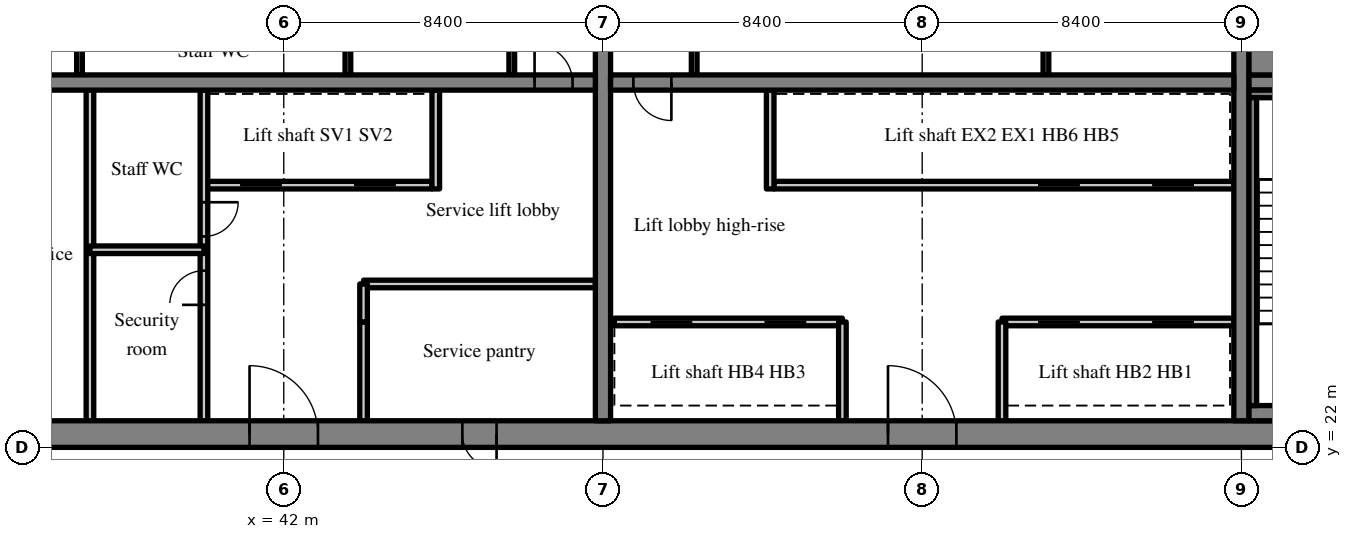
"""IFC4 building model, lengths in metres.
Left out: names, types, materials, properties, quantities, classifications, styles, units other than length and angle.
Written with IfcOpenShell. Run it as: python <this file> out.ifc"""

import sys

from ifc_helpers import new_model, si_unit, direction, frame, frame_2d, origin, place, context, subcontext, project, spatial, rectangle, extrude, source, transform, mapped, element, fill, save


model = new_model("IFC4")
c1 = context("Model", 3, precision=1e-05, world=origin(), true_north=direction((0.0, 1.0)))
c2 = subcontext(c1, "Body", "Model", "MODEL_VIEW")
j1 = project(units=[si_unit("LENGTHUNIT", "METRE"), si_unit("PLANEANGLEUNIT", "RADIAN")], contexts=[c1])
p1 = place(None, origin())
s1 = spatial("IfcSite", under=j1, at=p1, CompositionType="ELEMENT")
p2 = place(p1, origin())
s2 = spatial("IfcBuilding", under=s1, at=p2, CompositionType="ELEMENT")
p3 = place(p2, frame((0.0, 0.0, 193.4)))
s3 = spatial("IfcBuildingStorey", under=s2, at=p3, CompositionType="ELEMENT", Elevation=193.4)
m1 = source(origin(), c2, "Body", "SweptSolid", [
    extrude(rectangle(XDim=50.4, YDim=0.7, at=frame_2d((25.2, 0.0))), origin(), (0.0, 0.0, 1.0), 3.52),
])
p4 = place(p3, frame((25.2, 22.35, 0.0), z_axis=(0.0, 0.0, 1.0), x_axis=(1.0, 0.0, 0.0)))
e1 = element("IfcWall", 1, at=p4, inside=s3, PredefinedType="SHEAR", context=c2, shape_type="MappedRepresentation", body=[
    mapped(m1, transform((0.0, 0.0, 0.0), scale=1.0)),
])
m2 = source(origin(), c2, "Body", "SweptSolid", [
    extrude(rectangle(XDim=1.8, YDim=2.1, at=frame_2d((0.9, 1.05))), frame((0.0, 0.36, 0.0), z_axis=(0.0, -1.0, 0.0), x_axis=(1.0, 0.0, 0.0)), (0.0, 0.0, 1.0), 0.72),
])
p5 = place(p4, frame((15.9, 0.0, 0.0)))
e2 = element("IfcOpeningElement", 2, at=p5, cuts=e1, PredefinedType="OPENING", context=c2, shape_type="MappedRepresentation", body=[
    mapped(m2, transform((0.0, 0.0, 0.0), scale=1.0)),
])
m3 = source(origin(), c2, "Body", "SweptSolid", [
    extrude(rectangle(XDim=0.9, YDim=2.1, at=frame_2d((0.45, 1.05))), frame((0.0, 0.36, 0.0), z_axis=(0.0, -1.0, 0.0), x_axis=(1.0, 0.0, 0.0)), (0.0, 0.0, 1.0), 0.72),
])
p6 = place(p4, frame((9.7, 0.0, 0.0)))
e3 = element("IfcOpeningElement", 3, at=p6, cuts=e1, PredefinedType="OPENING", context=c2, shape_type="MappedRepresentation", body=[
    mapped(m3, transform((0.0, 0.0, 0.0), scale=1.0)),
])
p7 = place(p4, frame((21.5, 0.0, 0.0)))
e4 = element("IfcOpeningElement", 4, at=p7, cuts=e1, PredefinedType="OPENING", context=c2, shape_type="MappedRepresentation", body=[
    mapped(m3, transform((0.0, 0.0, 0.0), scale=1.0)),
])
p8 = place(p4, frame((32.7, 0.0, 0.0)))
e5 = element("IfcOpeningElement", 5, at=p8, cuts=e1, PredefinedType="OPENING", context=c2, shape_type="MappedRepresentation", body=[
    mapped(m2, transform((0.0, 0.0, 0.0), scale=1.0)),
])
m4 = source(origin(), c2, "Body", "SweptSolid", [
    extrude(rectangle(XDim=1.2, YDim=2.1, at=frame_2d((0.6, 1.05))), frame((0.0, 0.36, 0.0), z_axis=(0.0, -1.0, 0.0), x_axis=(1.0, 0.0, 0.0)), (0.0, 0.0, 1.0), 0.72),
])
p9 = place(p4, frame((6.475, 0.0, 0.0)))
e6 = element("IfcOpeningElement", 6, at=p9, cuts=e1, PredefinedType="OPENING", context=c2, shape_type="MappedRepresentation", body=[
    mapped(m4, transform((0.0, 0.0, 0.0), scale=1.0)),
])
p10 = place(p4, frame((47.875, 0.0, 0.0)))
e7 = element("IfcOpeningElement", 7, at=p10, cuts=e1, PredefinedType="OPENING", context=c2, shape_type="MappedRepresentation", body=[
    mapped(m4, transform((0.0, 0.0, 0.0), scale=1.0)),
])
m5 = source(origin(), c2, "Body", "SweptSolid", [
    extrude(rectangle(XDim=18.6, YDim=0.4, at=frame_2d((9.3, 0.0))), origin(), (0.0, 0.0, 1.0), 3.52),
])
p11 = place(p3, frame((50.4, 22.7, 0.0), z_axis=(0.0, 0.0, 1.0), x_axis=(0.0, 1.0, 0.0)))
e8 = element("IfcWall", 8, at=p11, inside=s3, PredefinedType="SHEAR", context=c2, shape_type="MappedRepresentation", body=[
    mapped(m5, transform((0.0, 0.0, 0.0), scale=1.0)),
])
m6 = source(origin(), c2, "Body", "SweptSolid", [
    extrude(rectangle(XDim=1.1, YDim=2.1, at=frame_2d((0.55, 1.05))), frame((0.0, 0.21, 0.0), z_axis=(0.0, -1.0, 0.0), x_axis=(1.0, 0.0, 0.0)), (0.0, 0.0, 1.0), 0.42),
])
p12 = place(p11, frame((12.75, 0.0, 0.0)))
e9 = element("IfcOpeningElement", 9, at=p12, cuts=e8, PredefinedType="OPENING", context=c2, shape_type="MappedRepresentation", body=[
    mapped(m6, transform((0.0, 0.0, 0.0), scale=1.0)),
])
p13 = place(p3, frame((67.2, 22.7, 0.0), z_axis=(0.0, 0.0, 1.0), x_axis=(0.0, 1.0, 0.0)))
e10 = element("IfcWall", 10, at=p13, inside=s3, PredefinedType="SHEAR", context=c2, shape_type="MappedRepresentation", body=[
    mapped(m5, transform((0.0, 0.0, 0.0), scale=1.0)),
])
m7 = source(origin(), c2, "Body", "SweptSolid", [
    extrude(rectangle(XDim=16.4, YDim=0.4, at=frame_2d((8.2, 0.0))), origin(), (0.0, 0.0, 1.0), 3.52),
])
p14 = place(p3, frame((33.8, 31.6, 0.0), z_axis=(0.0, 0.0, 1.0), x_axis=(1.0, 0.0, 0.0)))
e11 = element("IfcWall", 11, at=p14, inside=s3, PredefinedType="SHEAR", context=c2, shape_type="MappedRepresentation", body=[
    mapped(m7, transform((0.0, 0.0, 0.0), scale=1.0)),
])
m8 = source(origin(), c2, "Body", "SweptSolid", [
    extrude(rectangle(XDim=1.0, YDim=2.1, at=frame_2d((0.5, 1.05))), frame((0.0, 0.21, 0.0), z_axis=(0.0, -1.0, 0.0), x_axis=(1.0, 0.0, 0.0)), (0.0, 0.0, 1.0), 0.42),
])
p15 = place(p14, frame((14.8, 0.0, 0.0)))
e12 = element("IfcOpeningElement", 12, at=p15, cuts=e11, PredefinedType="OPENING", context=c2, shape_type="MappedRepresentation", body=[
    mapped(m8, transform((0.0, 0.0, 0.0), scale=1.0)),
])
p16 = place(p3, frame((50.6, 31.6, 0.0), z_axis=(0.0, 0.0, 1.0), x_axis=(1.0, 0.0, 0.0)))
e13 = element("IfcWall", 13, at=p16, inside=s3, PredefinedType="SHEAR", context=c2, shape_type="MappedRepresentation", body=[
    mapped(m7, transform((0.0, 0.0, 0.0), scale=1.0)),
])
p17 = place(p16, frame((0.6, 0.0, 0.0)))
e14 = element("IfcOpeningElement", 14, at=p17, cuts=e13, PredefinedType="OPENING", context=c2, shape_type="MappedRepresentation", body=[
    mapped(m8, transform((0.0, 0.0, 0.0), scale=1.0)),
])
m9 = source(origin(), c2, "Body", "SweptSolid", [
    extrude(rectangle(XDim=7.5, YDim=0.4, at=frame_2d((3.75, 0.0))), origin(), (0.0, 0.0, 1.0), 3.52),
])
p18 = place(p3, frame((67.4, 31.6, 0.0), z_axis=(0.0, 0.0, 1.0), x_axis=(1.0, 0.0, 0.0)))
e15 = element("IfcWall", 15, at=p18, inside=s3, PredefinedType="SHEAR", context=c2, shape_type="MappedRepresentation", body=[
    mapped(m9, transform((0.0, 0.0, 0.0), scale=1.0)),
])
p19 = place(p18, frame((5.725, 0.0, 0.0)))
e16 = element("IfcOpeningElement", 16, at=p19, cuts=e15, PredefinedType="OPENING", context=c2, shape_type="MappedRepresentation", body=[
    mapped(m6, transform((0.0, 0.0, 0.0), scale=1.0)),
])
m10 = source(origin(), c2, "Body", "SweptSolid", [
    extrude(rectangle(XDim=6.0, YDim=0.2, at=frame_2d((3.0, 0.0))), origin(), (0.0, 0.0, 1.0), 3.52),
])
p20 = place(p3, frame((39.9, 28.9, 0.0), z_axis=(0.0, 0.0, 1.0), x_axis=(1.0, 0.0, 0.0)))
e17 = element("IfcWall", 17, at=p20, inside=s3, PredefinedType="SOLIDWALL", context=c2, shape_type="MappedRepresentation", body=[
    mapped(m10, transform((0.0, 0.0, 0.0), scale=1.0)),
])
m11 = source(origin(), c2, "Body", "SweptSolid", [
    extrude(rectangle(XDim=1.1, YDim=2.1, at=frame_2d((0.55, 1.05))), frame((0.0, 0.11, 0.0), z_axis=(0.0, -1.0, 0.0), x_axis=(1.0, 0.0, 0.0)), (0.0, 0.0, 1.0), 0.22),
])
p21 = place(p20, frame((0.95, 0.0, 0.0)))
e18 = element("IfcOpeningElement", 18, at=p21, cuts=e17, PredefinedType="OPENING", context=c2, shape_type="MappedRepresentation", body=[
    mapped(m11, transform((0.0, 0.0, 0.0), scale=1.0)),
])
p22 = place(p20, frame((3.95, 0.0, 0.0)))
e19 = element("IfcOpeningElement", 19, at=p22, cuts=e17, PredefinedType="OPENING", context=c2, shape_type="MappedRepresentation", body=[
    mapped(m11, transform((0.0, 0.0, 0.0), scale=1.0)),
])
m12 = source(origin(), c2, "Body", "SweptSolid", [
    extrude(rectangle(XDim=8.7, YDim=0.2, at=frame_2d((4.35, 0.0))), origin(), (0.0, 0.0, 1.0), 3.52),
])
p23 = place(p3, frame((39.9, 22.7, 0.0), z_axis=(0.0, 0.0, 1.0), x_axis=(0.0, 1.0, 0.0)))
e20 = element("IfcWall", 20, at=p23, inside=s3, PredefinedType="PARTITIONING", context=c2, shape_type="MappedRepresentation", body=[
    mapped(m12, transform((0.0, 0.0, 0.0), scale=1.0)),
])
m13 = source(origin(), c2, "Body", "SweptSolid", [
    extrude(rectangle(XDim=0.9, YDim=2.1, at=frame_2d((0.45, 1.05))), frame((0.0, 0.11, 0.0), z_axis=(0.0, -1.0, 0.0), x_axis=(1.0, 0.0, 0.0)), (0.0, 0.0, 1.0), 0.22),
])
p24 = place(p23, frame((3.05, 0.0, 0.0)))
e21 = element("IfcOpeningElement", 21, at=p24, cuts=e20, PredefinedType="OPENING", context=c2, shape_type="MappedRepresentation", body=[
    mapped(m13, transform((0.0, 0.0, 0.0), scale=1.0)),
])
p25 = place(p23, frame((4.85, 0.0, 0.0)))
e22 = element("IfcOpeningElement", 22, at=p25, cuts=e20, PredefinedType="OPENING", context=c2, shape_type="MappedRepresentation", body=[
    mapped(m13, transform((0.0, 0.0, 0.0), scale=1.0)),
])
m14 = source(origin(), c2, "Body", "SweptSolid", [
    extrude(rectangle(XDim=2.6, YDim=0.2, at=frame_2d((1.3, 0.0))), origin(), (0.0, 0.0, 1.0), 3.52),
])
p26 = place(p3, frame((44.1, 22.7, 0.0), z_axis=(0.0, 0.0, 1.0), x_axis=(0.0, 1.0, 0.0)))
e23 = element("IfcWall", 23, at=p26, inside=s3, PredefinedType="PARTITIONING", context=c2, shape_type="MappedRepresentation", body=[
    mapped(m14, transform((0.0, 0.0, 0.0), scale=1.0)),
])
m15 = source(origin(), c2, "Body", "SweptSolid", [
    extrude(rectangle(XDim=2.6, YDim=0.2, at=frame_2d((1.3, 0.0))), origin(), (0.0, 0.0, 1.0), 3.52),
])
p27 = place(p3, frame((46.0, 28.8, 0.0), z_axis=(0.0, 0.0, 1.0), x_axis=(0.0, 1.0, 0.0)))
e24 = element("IfcWall", 24, at=p27, inside=s3, PredefinedType="SOLIDWALL", context=c2, shape_type="MappedRepresentation", body=[
    mapped(m15, transform((0.0, 0.0, 0.0), scale=1.0)),
])
p28 = place(p3, frame((36.9, 22.7, 0.0), z_axis=(0.0, 0.0, 1.0), x_axis=(0.0, 1.0, 0.0)))
e25 = element("IfcWall", 25, at=p28, inside=s3, PredefinedType="PARTITIONING", context=c2, shape_type="MappedRepresentation", body=[
    mapped(m12, transform((0.0, 0.0, 0.0), scale=1.0)),
])
m16 = source(origin(), c2, "Body", "SweptSolid", [
    extrude(rectangle(XDim=3.0, YDim=0.2, at=frame_2d((1.5, 0.0))), origin(), (0.0, 0.0, 1.0), 3.52),
])
p29 = place(p3, frame((36.9, 27.2, 0.0), z_axis=(0.0, 0.0, 1.0), x_axis=(1.0, 0.0, 0.0)))
e26 = element("IfcWall", 26, at=p29, inside=s3, PredefinedType="PARTITIONING", context=c2, shape_type="MappedRepresentation", body=[
    mapped(m16, transform((0.0, 0.0, 0.0), scale=1.0)),
])
m17 = source(origin(), c2, "Body", "SweptSolid", [
    extrude(rectangle(XDim=6.1, YDim=0.2, at=frame_2d((3.05, 0.0))), origin(), (0.0, 0.0, 1.0), 3.52),
])
p30 = place(p3, frame((44.1, 26.3, 0.0), z_axis=(0.0, 0.0, 1.0), x_axis=(1.0, 0.0, 0.0)))
e27 = element("IfcWall", 27, at=p30, inside=s3, PredefinedType="PARTITIONING", context=c2, shape_type="MappedRepresentation", body=[
    mapped(m17, transform((0.0, 0.0, 0.0), scale=1.0)),
])
m18 = source(origin(), c2, "Body", "SweptSolid", [
    extrude(rectangle(XDim=1.0, YDim=0.2, at=frame_2d((0.5, 0.0))), origin(), (0.0, 0.0, 1.0), 3.52),
])
p31 = place(p3, frame((44.1, 25.3, 0.0), z_axis=(0.0, 0.0, 1.0), x_axis=(0.0, 1.0, 0.0)))
e28 = element("IfcWall", 28, at=p31, inside=s3, PredefinedType="PARTITIONING", context=c2, shape_type="MappedRepresentation", body=[
    mapped(m18, transform((0.0, 0.0, 0.0), scale=1.0)),
])
m19 = source(origin(), c2, "Body", "SweptSolid", [
    extrude(rectangle(XDim=3.2, YDim=0.15, at=frame_2d((1.6, 0.0))), origin(), (0.0, 0.0, 1.0), 3.52),
])
for number, where, z_axis, x_axis in (
    (29, (48.0, 31.8, 0.0), (0.0, 0.0, 1.0), (0.0, 1.0, 0.0)),
    (30, (36.625, 31.8, 0.0), (0.0, 0.0, 1.0), (0.0, 1.0, 0.0)),
    (31, (43.688, 31.8, 0.0), (0.0, 0.0, 1.0), (0.0, 1.0, 0.0)),
):
    element("IfcWall", number, at=place(p3, frame(where, z_axis=z_axis, x_axis=x_axis)), inside=s3, PredefinedType="PARTITIONING", context=c2, shape_type="MappedRepresentation", body=[
        mapped(m19, transform((0.0, 0.0, 0.0), scale=1.0)),
    ])
m20 = source(origin(), c2, "Body", "SweptSolid", [
    extrude(rectangle(XDim=6.1, YDim=0.2, at=frame_2d((3.05, 0.0))), origin(), (0.0, 0.0, 1.0), 3.52),
])
p32 = place(p3, frame((67.0, 25.3, 0.0), z_axis=(0.0, 0.0, 1.0), x_axis=(-1.0, 0.0, 0.0)))
e32 = element("IfcWall", 32, at=p32, inside=s3, PredefinedType="SOLIDWALL", context=c2, shape_type="MappedRepresentation", body=[
    mapped(m20, transform((0.0, 0.0, 0.0), scale=1.0)),
])
p33 = place(p32, frame((1.05, 0.0, 0.0)))
e33 = element("IfcOpeningElement", 33, at=p33, cuts=e32, PredefinedType="OPENING", context=c2, shape_type="MappedRepresentation", body=[
    mapped(m11, transform((0.0, 0.0, 0.0), scale=1.0)),
])
p34 = place(p32, frame((4.05, 0.0, 0.0)))
e34 = element("IfcOpeningElement", 34, at=p34, cuts=e32, PredefinedType="OPENING", context=c2, shape_type="MappedRepresentation", body=[
    mapped(m11, transform((0.0, 0.0, 0.0), scale=1.0)),
])
p35 = place(p3, frame((56.7, 25.3, 0.0), z_axis=(0.0, 0.0, 1.0), x_axis=(-1.0, 0.0, 0.0)))
e35 = element("IfcWall", 35, at=p35, inside=s3, PredefinedType="SOLIDWALL", context=c2, shape_type="MappedRepresentation", body=[
    mapped(m10, transform((0.0, 0.0, 0.0), scale=1.0)),
])
p36 = place(p35, frame((0.95, 0.0, 0.0)))
e36 = element("IfcOpeningElement", 36, at=p36, cuts=e35, PredefinedType="OPENING", context=c2, shape_type="MappedRepresentation", body=[
    mapped(m11, transform((0.0, 0.0, 0.0), scale=1.0)),
])
p37 = place(p35, frame((3.95, 0.0, 0.0)))
e37 = element("IfcOpeningElement", 37, at=p37, cuts=e35, PredefinedType="OPENING", context=c2, shape_type="MappedRepresentation", body=[
    mapped(m11, transform((0.0, 0.0, 0.0), scale=1.0)),
])
m21 = source(origin(), c2, "Body", "SweptSolid", [
    extrude(rectangle(XDim=12.1, YDim=0.2, at=frame_2d((6.05, 0.0))), origin(), (0.0, 0.0, 1.0), 3.52),
])
p38 = place(p3, frame((67.0, 28.9, 0.0), z_axis=(0.0, 0.0, 1.0), x_axis=(-1.0, 0.0, 0.0)))
e38 = element("IfcWall", 38, at=p38, inside=s3, PredefinedType="SOLIDWALL", context=c2, shape_type="MappedRepresentation", body=[
    mapped(m21, transform((0.0, 0.0, 0.0), scale=1.0)),
])
p39 = place(p38, frame((1.05, 0.0, 0.0)))
e39 = element("IfcOpeningElement", 39, at=p39, cuts=e38, PredefinedType="OPENING", context=c2, shape_type="MappedRepresentation", body=[
    mapped(m11, transform((0.0, 0.0, 0.0), scale=1.0)),
])
p40 = place(p38, frame((4.05, 0.0, 0.0)))
e40 = element("IfcOpeningElement", 40, at=p40, cuts=e38, PredefinedType="OPENING", context=c2, shape_type="MappedRepresentation", body=[
    mapped(m11, transform((0.0, 0.0, 0.0), scale=1.0)),
])
for number, where, z_axis, x_axis in (
    (41, (60.9, 22.7, 0.0), (0.0, 0.0, 1.0), (0.0, 1.0, 0.0)),
    (42, (56.7, 22.7, 0.0), (0.0, 0.0, 1.0), (0.0, 1.0, 0.0)),
):
    element("IfcWall", number, at=place(p3, frame(where, z_axis=z_axis, x_axis=x_axis)), inside=s3, PredefinedType="SOLIDWALL", context=c2, shape_type="MappedRepresentation", body=[
        mapped(m14, transform((0.0, 0.0, 0.0), scale=1.0)),
    ])
p41 = place(p3, frame((54.8, 28.8, 0.0), z_axis=(0.0, 0.0, 1.0), x_axis=(0.0, 1.0, 0.0)))
e43 = element("IfcWall", 43, at=p41, inside=s3, PredefinedType="SOLIDWALL", context=c2, shape_type="MappedRepresentation", body=[
    mapped(m15, transform((0.0, 0.0, 0.0), scale=1.0)),
])
for number, where, z_axis, x_axis in (
    (44, (52.8, 31.8, 0.0), (0.0, 0.0, 1.0), (0.0, 1.0, 0.0)),
    (45, (62.056, 31.8, 0.0), (0.0, 0.0, 1.0), (0.0, 1.0, 0.0)),
):
    element("IfcWall", number, at=place(p3, frame(where, z_axis=z_axis, x_axis=x_axis)), inside=s3, PredefinedType="PARTITIONING", context=c2, shape_type="MappedRepresentation", body=[
        mapped(m19, transform((0.0, 0.0, 0.0), scale=1.0)),
    ])
m22 = source(origin(), c2, "Body", "SweptSolid", [
    extrude(rectangle(XDim=4.85, YDim=0.4, at=frame_2d((2.425, 0.0))), origin(), (0.0, 0.0, 1.0), 3.52),
])
p42 = place(p3, frame((67.4, 22.9, 0.0), z_axis=(0.0, 0.0, 1.0), x_axis=(1.0, 0.0, 0.0)))
e46 = element("IfcWall", 46, at=p42, inside=s3, PredefinedType="SOLIDWALL", context=c2, shape_type="MappedRepresentation", body=[
    mapped(m22, transform((0.0, 0.0, 0.0), scale=1.0)),
])
m23 = source(origin(), c2, "Body", "SweptSolid", [
    extrude(rectangle(XDim=4.85, YDim=0.2, at=frame_2d((2.425, 0.0))), origin(), (0.0, 0.0, 1.0), 3.52),
])
p43 = place(p3, frame((67.4, 31.3, 0.0), z_axis=(0.0, 0.0, 1.0), x_axis=(1.0, 0.0, 0.0)))
e47 = element("IfcWall", 47, at=p43, inside=s3, PredefinedType="SOLIDWALL", context=c2, shape_type="MappedRepresentation", body=[
    mapped(m23, transform((0.0, 0.0, 0.0), scale=1.0)),
])
m24 = source(origin(), c2, "Body", "SweptSolid", [
    extrude(rectangle(XDim=8.1, YDim=0.2, at=frame_2d((4.05, 0.0))), origin(), (0.0, 0.0, 1.0), 3.52),
])
p44 = place(p3, frame((67.5, 23.1, 0.0), z_axis=(0.0, 0.0, 1.0), x_axis=(0.0, 1.0, 0.0)))
e48 = element("IfcWall", 48, at=p44, inside=s3, PredefinedType="SOLIDWALL", context=c2, shape_type="MappedRepresentation", body=[
    mapped(m24, transform((0.0, 0.0, 0.0), scale=1.0)),
])
m25 = source(origin(), c2, "Body", "SweptSolid", [
    extrude(rectangle(XDim=4.85, YDim=1.0, at=frame_2d((2.425, 0.0))), origin(), (0.0, 0.0, 1.0), 3.52),
])
p45 = place(p3, frame((67.4, 32.3, 0.0), z_axis=(0.0, 0.0, 1.0), x_axis=(1.0, 0.0, 0.0)))
e49 = element("IfcWall", 49, at=p45, inside=s3, PredefinedType="SOLIDWALL", context=c2, shape_type="MappedRepresentation", body=[
    mapped(m25, transform((0.0, 0.0, 0.0), scale=1.0)),
])
m26 = source(origin(), c2, "Body", "SweptSolid", [
    extrude(rectangle(XDim=1.8, YDim=2.1, at=frame_2d((0.9, 1.05))), frame((0.0, 0.275, 0.0), z_axis=(0.0, -1.0, 0.0), x_axis=(1.0, 0.0, 0.0)), (0.0, 0.0, 1.0), 0.05),
])
p46 = place(p5, origin())
e50 = element("IfcDoor", 50, at=p46, inside=s3, OperationType="DOUBLE_DOOR_SINGLE_SWING", PredefinedType="DOOR", context=c2, shape_type="MappedRepresentation", body=[
    mapped(m26, transform((0.0, 0.0, 0.0), scale=1.0)),
])
fill(e2, e50)
m27 = source(origin(), c2, "Body", "SweptSolid", [
    extrude(rectangle(XDim=1.0, YDim=2.1, at=frame_2d((0.5, 1.05))), frame((0.0, 0.025, 0.0), z_axis=(0.0, -1.0, 0.0), x_axis=(1.0, 0.0, 0.0)), (0.0, 0.0, 1.0), 0.05),
])
p47 = place(p15, origin())
e51 = element("IfcDoor", 51, at=p47, inside=s3, OperationType="SINGLE_SWING_LEFT", PredefinedType="DOOR", context=c2, shape_type="MappedRepresentation", body=[
    mapped(m27, transform((0.0, 0.0, 0.0), scale=1.0)),
])
fill(e12, e51)
m28 = source(origin(), c2, "Body", "SweptSolid", [
    extrude(rectangle(XDim=1.1, YDim=2.1, at=frame_2d((0.55, 1.05))), frame((0.0, 0.025, 0.0), z_axis=(0.0, -1.0, 0.0), x_axis=(1.0, 0.0, 0.0)), (0.0, 0.0, 1.0), 0.05),
])
p48 = place(p21, origin())
e52 = element("IfcDoor", 52, at=p48, inside=s3, OperationType="SLIDING_TO_LEFT", PredefinedType="DOOR", context=c2, shape_type="MappedRepresentation", body=[
    mapped(m28, transform((0.0, 0.0, 0.0), scale=1.0)),
])
fill(e18, e52)
p49 = place(p22, origin())
e53 = element("IfcDoor", 53, at=p49, inside=s3, OperationType="SLIDING_TO_RIGHT", PredefinedType="DOOR", context=c2, shape_type="MappedRepresentation", body=[
    mapped(m28, transform((0.0, 0.0, 0.0), scale=1.0)),
])
fill(e19, e53)
m29 = source(origin(), c2, "Body", "SweptSolid", [
    extrude(rectangle(XDim=0.9, YDim=2.1, at=frame_2d((0.45, 1.05))), frame((0.0, 0.025, 0.0), z_axis=(0.0, -1.0, 0.0), x_axis=(1.0, 0.0, 0.0)), (0.0, 0.0, 1.0), 0.05),
])
p50 = place(p24, origin())
e54 = element("IfcDoor", 54, at=p50, inside=s3, OperationType="SINGLE_SWING_LEFT", PredefinedType="DOOR", context=c2, shape_type="MappedRepresentation", body=[
    mapped(m29, transform((0.0, 0.0, 0.0), scale=1.0)),
])
fill(e21, e54)
p51 = place(p25, origin())
e55 = element("IfcDoor", 55, at=p51, inside=s3, OperationType="SINGLE_SWING_RIGHT", PredefinedType="DOOR", context=c2, shape_type="MappedRepresentation", body=[
    mapped(m29, transform((0.0, 0.0, 0.0), scale=1.0)),
])
fill(e22, e55)
m30 = source(origin(), c2, "Body", "SweptSolid", [
    extrude(rectangle(XDim=0.9, YDim=2.1, at=frame_2d((0.45, 1.05))), frame((0.0, 0.275, 0.0), z_axis=(0.0, -1.0, 0.0), x_axis=(1.0, 0.0, 0.0)), (0.0, 0.0, 1.0), 0.05),
])
p52 = place(p7, origin())
e56 = element("IfcDoor", 56, at=p52, inside=s3, OperationType="SINGLE_SWING_RIGHT", PredefinedType="DOOR", context=c2, shape_type="MappedRepresentation", body=[
    mapped(m30, transform((0.0, 0.0, 0.0), scale=1.0)),
])
fill(e4, e56)
p53 = place(p8, origin())
e57 = element("IfcDoor", 57, at=p53, inside=s3, OperationType="DOUBLE_DOOR_SINGLE_SWING", PredefinedType="DOOR", context=c2, shape_type="MappedRepresentation", body=[
    mapped(m26, transform((0.0, 0.0, 0.0), scale=1.0)),
])
fill(e5, e57)
p54 = place(p17, origin())
e58 = element("IfcDoor", 58, at=p54, inside=s3, OperationType="SINGLE_SWING_RIGHT", PredefinedType="DOOR", context=c2, shape_type="MappedRepresentation", body=[
    mapped(m27, transform((0.0, 0.0, 0.0), scale=1.0)),
])
fill(e14, e58)
p55 = place(p33, origin())
e59 = element("IfcDoor", 59, at=p55, inside=s3, OperationType="SLIDING_TO_RIGHT", PredefinedType="DOOR", context=c2, shape_type="MappedRepresentation", body=[
    mapped(m28, transform((0.0, 0.0, 0.0), scale=1.0)),
])
fill(e33, e59)
p56 = place(p34, origin())
e60 = element("IfcDoor", 60, at=p56, inside=s3, OperationType="SLIDING_TO_LEFT", PredefinedType="DOOR", context=c2, shape_type="MappedRepresentation", body=[
    mapped(m28, transform((0.0, 0.0, 0.0), scale=1.0)),
])
fill(e34, e60)
p57 = place(p36, origin())
e61 = element("IfcDoor", 61, at=p57, inside=s3, OperationType="SLIDING_TO_RIGHT", PredefinedType="DOOR", context=c2, shape_type="MappedRepresentation", body=[
    mapped(m28, transform((0.0, 0.0, 0.0), scale=1.0)),
])
fill(e36, e61)
p58 = place(p37, origin())
e62 = element("IfcDoor", 62, at=p58, inside=s3, OperationType="SLIDING_TO_LEFT", PredefinedType="DOOR", context=c2, shape_type="MappedRepresentation", body=[
    mapped(m28, transform((0.0, 0.0, 0.0), scale=1.0)),
])
fill(e37, e62)
p59 = place(p39, origin())
e63 = element("IfcDoor", 63, at=p59, inside=s3, OperationType="SLIDING_TO_RIGHT", PredefinedType="DOOR", context=c2, shape_type="MappedRepresentation", body=[
    mapped(m28, transform((0.0, 0.0, 0.0), scale=1.0)),
])
fill(e39, e63)
p60 = place(p40, origin())
e64 = element("IfcDoor", 64, at=p60, inside=s3, OperationType="SLIDING_TO_LEFT", PredefinedType="DOOR", context=c2, shape_type="MappedRepresentation", body=[
    mapped(m28, transform((0.0, 0.0, 0.0), scale=1.0)),
])
fill(e40, e64)
save(model, sys.argv[1])
